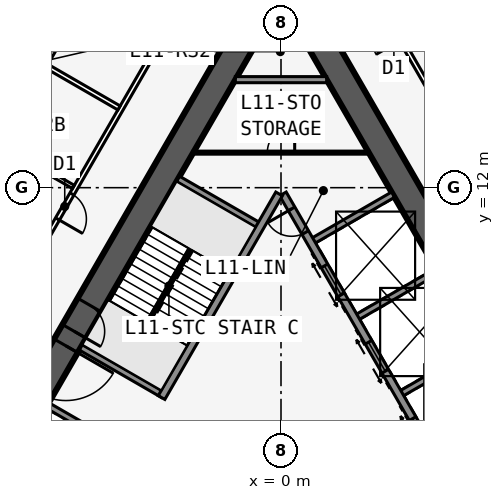
"""IFC4 building model, lengths in metres.
Left out: names, types, materials, properties, quantities, classifications, styles, units other than length and angle.
Written with IfcOpenShell. Run it as: python <this file> out.ifc"""

import sys

from ifc_helpers import new_model, si_unit, direction, frame, frame_2d, origin, place, context, subcontext, project, spatial, rectangle, extrude, element, fill, save


model = new_model("IFC4")
c1 = context("Model", 3, precision=1e-05, world=origin(), true_north=direction((0.0, 1.0)))
c2 = subcontext(c1, "Body", "Model", "MODEL_VIEW")
j1 = project(units=[si_unit("LENGTHUNIT", "METRE"), si_unit("PLANEANGLEUNIT", "RADIAN")], contexts=[c1])
p1 = place(None, origin())
s1 = spatial("IfcSite", under=j1, at=p1, CompositionType="ELEMENT")
p2 = place(p1, origin())
s2 = spatial("IfcBuilding", under=s1, at=p2, CompositionType="ELEMENT")
p3 = place(p2, frame((0.0, 0.0, 48.9)))
s3 = spatial("IfcBuildingStorey", under=s2, at=p3, CompositionType="ELEMENT", Elevation=48.9)
p4 = place(p3, frame((16.5, -9.526, 0.0), z_axis=(0.0, 0.0, 1.0), x_axis=(-0.499999749417, 0.866025548458, 0.0)))
e1 = element("IfcWall", 1, at=p4, inside=s3, PredefinedType="SHEAR", context=c2, shape_type="SweptSolid", body=[
    extrude(rectangle(XDim=33.0, YDim=0.9, at=frame_2d((16.5, 0.0))), origin(), (0.0, 0.0, 1.0), 3.4),
])
p5 = place(p4, frame((14.15, 0.0, 0.0)))
e2 = element("IfcOpeningElement", 2, at=p5, cuts=e1, PredefinedType="OPENING", context=c2, shape_type="SweptSolid", body=[
    extrude(rectangle(XDim=1.8, YDim=2.13, at=frame_2d((0.9, 1.065))), frame((0.0, 0.46, 0.0), z_axis=(0.0, -1.0, 0.0), x_axis=(1.0, 0.0, 0.0)), (0.0, 0.0, 1.0), 0.92),
])
p6 = place(p4, frame((12.6, 0.0, 0.0)))
e3 = element("IfcOpeningElement", 3, at=p6, cuts=e1, PredefinedType="OPENING", context=c2, shape_type="SweptSolid", body=[
    extrude(rectangle(XDim=1.0, YDim=2.13, at=frame_2d((0.5, 1.065))), frame((0.0, 0.46, 0.0), z_axis=(0.0, -1.0, 0.0), x_axis=(1.0, 0.0, 0.0)), (0.0, 0.0, 1.0), 0.92),
])
p7 = place(p3, frame((5.379, 2.586, 0.0), z_axis=(0.0, 0.0, 1.0), x_axis=(-0.500001375892, 0.866024609411, 0.0)))
e4 = element("IfcWall", 4, at=p7, inside=s3, PredefinedType="SOLIDWALL", context=c2, shape_type="SweptSolid", body=[
    extrude(rectangle(XDim=10.633, YDim=0.25, at=frame_2d((5.316, 0.0))), origin(), (0.0, 0.0, 1.0), 3.235),
])
p8 = place(p7, frame((9.164, 0.0, 0.0)))
e5 = element("IfcOpeningElement", 5, at=p8, cuts=e4, PredefinedType="OPENING", context=c2, shape_type="SweptSolid", body=[
    extrude(rectangle(XDim=0.9, YDim=2.13, at=frame_2d((0.45, 1.065))), frame((0.0, 0.135, 0.0), z_axis=(0.0, -1.0, 0.0), x_axis=(1.0, 0.0, 0.0)), (0.0, 0.0, 1.0), 0.27),
])
p9 = place(p7, frame((1.0, 0.0, 0.0)))
e6 = element("IfcOpeningElement", 6, at=p9, cuts=e4, PredefinedType="OPENING", context=c2, shape_type="SweptSolid", body=[
    extrude(rectangle(XDim=1.1, YDim=2.13, at=frame_2d((0.55, 1.065))), frame((0.0, 0.135, 0.0), z_axis=(0.0, -1.0, 0.0), x_axis=(1.0, 0.0, 0.0)), (0.0, 0.0, 1.0), 0.27),
])
p10 = place(p7, frame((3.9, 0.0, 0.0)))
e7 = element("IfcOpeningElement", 7, at=p10, cuts=e4, PredefinedType="OPENING", context=c2, shape_type="SweptSolid", body=[
    extrude(rectangle(XDim=1.1, YDim=2.13, at=frame_2d((0.55, 1.065))), frame((0.0, 0.135, 0.0), z_axis=(0.0, -1.0, 0.0), x_axis=(1.0, 0.0, 0.0)), (0.0, 0.0, 1.0), 0.27),
])
p11 = place(p7, frame((6.8, 0.0, 0.0)))
e8 = element("IfcOpeningElement", 8, at=p11, cuts=e4, PredefinedType="OPENING", context=c2, shape_type="SweptSolid", body=[
    extrude(rectangle(XDim=1.1, YDim=2.13, at=frame_2d((0.55, 1.065))), frame((0.0, 0.135, 0.0), z_axis=(0.0, -1.0, 0.0), x_axis=(1.0, 0.0, 0.0)), (0.0, 0.0, 1.0), 0.27),
])
for number, where, z_axis, x_axis in (
    (9, (3.879, 5.184, 0.0), (0.0, 0.0, 1.0), (0.866, 0.5, 0.0)),
    (10, (2.429, 7.696, 0.0), (0.0, 0.0, 1.0), (0.866, 0.5, 0.0)),
    (11, (0.979, 10.207, 0.0), (0.0, 0.0, 1.0), (0.866, 0.5, 0.0)),
):
    element("IfcWall", number, at=place(p3, frame(where, z_axis=z_axis, x_axis=x_axis)), inside=s3, PredefinedType="SOLIDWALL", context=c2, shape_type="SweptSolid", body=[
        extrude(rectangle(XDim=3.125, YDim=0.2, at=frame_2d((1.562, 0.0))), origin(), (0.0, 0.0, 1.0), 3.235),
    ])
p12 = place(p3, frame((0.0, 19.052, 0.0), z_axis=(0.0, 0.0, 1.0), x_axis=(-0.499999749417, -0.866025548458, 0.0)))
e12 = element("IfcWall", 12, at=p12, inside=s3, PredefinedType="SHEAR", context=c2, shape_type="SweptSolid", body=[
    extrude(rectangle(XDim=33.0, YDim=0.9, at=frame_2d((16.5, 0.0))), origin(), (0.0, 0.0, 1.0), 3.4),
])
p13 = place(p12, frame((14.15, 0.0, 0.0)))
e13 = element("IfcOpeningElement", 13, at=p13, cuts=e12, PredefinedType="OPENING", context=c2, shape_type="SweptSolid", body=[
    extrude(rectangle(XDim=1.8, YDim=2.13, at=frame_2d((0.9, 1.065))), frame((0.0, 0.46, 0.0), z_axis=(0.0, -1.0, 0.0), x_axis=(1.0, 0.0, 0.0)), (0.0, 0.0, 1.0), 0.92),
])
p14 = place(p12, frame((12.6, 0.0, 0.0)))
e14 = element("IfcOpeningElement", 14, at=p14, cuts=e12, PredefinedType="OPENING", context=c2, shape_type="SweptSolid", body=[
    extrude(rectangle(XDim=1.0, YDim=2.13, at=frame_2d((0.5, 1.065))), frame((0.0, 0.46, 0.0), z_axis=(0.0, -1.0, 0.0), x_axis=(1.0, 0.0, 0.0)), (0.0, 0.0, 1.0), 0.92),
])
p15 = place(p3, frame((-0.062, 11.794, 0.0), z_axis=(0.0, 0.0, 1.0), x_axis=(-0.500006680225, -0.86602154692, 0.0)))
e15 = element("IfcWall", 15, at=p15, inside=s3, PredefinedType="SOLIDWALL", context=c2, shape_type="SweptSolid", body=[
    extrude(rectangle(XDim=7.733, YDim=0.25, at=frame_2d((3.866, 0.0))), origin(), (0.0, 0.0, 1.0), 3.235),
])
for number, where, z_axis, x_axis in (
    (16, (-0.679, 10.727, 0.0), (0.0, 0.0, 1.0), (-0.866, 0.5, 0.0)),
    (17, (-3.879, 5.184, 0.0), (0.0, 0.0, 1.0), (-0.866, 0.5, 0.0)),
    (18, (-4.979, 3.279, 0.0), (0.0, 0.0, 1.0), (-0.866, 0.5, 0.0)),
):
    element("IfcWall", number, at=place(p3, frame(where, z_axis=z_axis, x_axis=x_axis)), inside=s3, PredefinedType="SOLIDWALL", context=c2, shape_type="SweptSolid", body=[
        extrude(rectangle(XDim=3.125, YDim=0.2, at=frame_2d((1.562, 0.0))), origin(), (0.0, 0.0, 1.0), 3.235),
    ])
p16 = place(p3, frame((20.027, -10.985, 0.0), z_axis=(0.0, 0.0, 1.0), x_axis=(-0.500001677587, 0.866024435227, 0.0)))
e19 = element("IfcWall", 19, at=p16, inside=s3, PredefinedType="PARTITIONING", context=c2, shape_type="SweptSolid", body=[
    extrude(rectangle(XDim=39.054, YDim=0.15, at=frame_2d((19.527, 0.0))), origin(), (0.0, 0.0, 1.0), 3.235),
])
p17 = place(p16, frame((1.558, 0.0, 0.0)))
e20 = element("IfcOpeningElement", 20, at=p17, cuts=e19, PredefinedType="OPENING", context=c2, shape_type="SweptSolid", body=[
    extrude(rectangle(XDim=0.95, YDim=2.13, at=frame_2d((0.475, 1.065))), frame((0.0, 0.085, 0.0), z_axis=(0.0, -1.0, 0.0), x_axis=(1.0, 0.0, 0.0)), (0.0, 0.0, 1.0), 0.17),
])
p18 = place(p16, frame((12.152, 0.0, 0.0)))
e21 = element("IfcOpeningElement", 21, at=p18, cuts=e19, PredefinedType="OPENING", context=c2, shape_type="SweptSolid", body=[
    extrude(rectangle(XDim=0.95, YDim=2.13, at=frame_2d((0.475, 1.065))), frame((0.0, 0.085, 0.0), z_axis=(0.0, -1.0, 0.0), x_axis=(1.0, 0.0, 0.0)), (0.0, 0.0, 1.0), 0.17),
])
p19 = place(p16, frame((17.152, 0.0, 0.0)))
e22 = element("IfcOpeningElement", 22, at=p19, cuts=e19, PredefinedType="OPENING", context=c2, shape_type="SweptSolid", body=[
    extrude(rectangle(XDim=0.95, YDim=2.13, at=frame_2d((0.475, 1.065))), frame((0.0, 0.085, 0.0), z_axis=(0.0, -1.0, 0.0), x_axis=(1.0, 0.0, 0.0)), (0.0, 0.0, 1.0), 0.17),
])
p20 = place(p16, frame((21.552, 0.0, 0.0)))
e23 = element("IfcOpeningElement", 23, at=p20, cuts=e19, PredefinedType="OPENING", context=c2, shape_type="SweptSolid", body=[
    extrude(rectangle(XDim=0.95, YDim=2.13, at=frame_2d((0.475, 1.065))), frame((0.0, 0.085, 0.0), z_axis=(0.0, -1.0, 0.0), x_axis=(1.0, 0.0, 0.0)), (0.0, 0.0, 1.0), 0.17),
])
p21 = place(p16, frame((32.152, 0.0, 0.0)))
e24 = element("IfcOpeningElement", 24, at=p21, cuts=e19, PredefinedType="OPENING", context=c2, shape_type="SweptSolid", body=[
    extrude(rectangle(XDim=0.95, YDim=2.13, at=frame_2d((0.475, 1.065))), frame((0.0, 0.085, 0.0), z_axis=(0.0, -1.0, 0.0), x_axis=(1.0, 0.0, 0.0)), (0.0, 0.0, 1.0), 0.17),
])
p22 = place(p16, frame((37.752, 0.0, 0.0)))
e25 = element("IfcOpeningElement", 25, at=p22, cuts=e19, PredefinedType="OPENING", context=c2, shape_type="SweptSolid", body=[
    extrude(rectangle(XDim=0.95, YDim=2.13, at=frame_2d((0.475, 1.065))), frame((0.0, 0.085, 0.0), z_axis=(0.0, -1.0, 0.0), x_axis=(1.0, 0.0, 0.0)), (0.0, 0.0, 1.0), 0.17),
])
p23 = place(p3, frame((-0.5, 22.836, 0.0), z_axis=(0.0, 0.0, 1.0), x_axis=(-0.500001677587, -0.866024435227, 0.0)))
e26 = element("IfcWall", 26, at=p23, inside=s3, PredefinedType="PARTITIONING", context=c2, shape_type="SweptSolid", body=[
    extrude(rectangle(XDim=39.054, YDim=0.15, at=frame_2d((19.527, 0.0))), origin(), (0.0, 0.0, 1.0), 3.235),
])
p24 = place(p23, frame((1.558, 0.0, 0.0)))
e27 = element("IfcOpeningElement", 27, at=p24, cuts=e26, PredefinedType="OPENING", context=c2, shape_type="SweptSolid", body=[
    extrude(rectangle(XDim=0.95, YDim=2.13, at=frame_2d((0.475, 1.065))), frame((0.0, 0.085, 0.0), z_axis=(0.0, -1.0, 0.0), x_axis=(1.0, 0.0, 0.0)), (0.0, 0.0, 1.0), 0.17),
])
p25 = place(p23, frame((12.752, 0.0, 0.0)))
e28 = element("IfcOpeningElement", 28, at=p25, cuts=e26, PredefinedType="OPENING", context=c2, shape_type="SweptSolid", body=[
    extrude(rectangle(XDim=0.95, YDim=2.13, at=frame_2d((0.475, 1.065))), frame((0.0, 0.085, 0.0), z_axis=(0.0, -1.0, 0.0), x_axis=(1.0, 0.0, 0.0)), (0.0, 0.0, 1.0), 0.17),
])
p26 = place(p23, frame((17.152, 0.0, 0.0)))
e29 = element("IfcOpeningElement", 29, at=p26, cuts=e26, PredefinedType="OPENING", context=c2, shape_type="SweptSolid", body=[
    extrude(rectangle(XDim=0.95, YDim=2.13, at=frame_2d((0.475, 1.065))), frame((0.0, 0.085, 0.0), z_axis=(0.0, -1.0, 0.0), x_axis=(1.0, 0.0, 0.0)), (0.0, 0.0, 1.0), 0.17),
])
p27 = place(p23, frame((22.152, 0.0, 0.0)))
e30 = element("IfcOpeningElement", 30, at=p27, cuts=e26, PredefinedType="OPENING", context=c2, shape_type="SweptSolid", body=[
    extrude(rectangle(XDim=0.95, YDim=2.13, at=frame_2d((0.475, 1.065))), frame((0.0, 0.085, 0.0), z_axis=(0.0, -1.0, 0.0), x_axis=(1.0, 0.0, 0.0)), (0.0, 0.0, 1.0), 0.17),
])
p28 = place(p23, frame((27.152, 0.0, 0.0)))
e31 = element("IfcOpeningElement", 31, at=p28, cuts=e26, PredefinedType="OPENING", context=c2, shape_type="SweptSolid", body=[
    extrude(rectangle(XDim=0.95, YDim=2.13, at=frame_2d((0.475, 1.065))), frame((0.0, 0.085, 0.0), z_axis=(0.0, -1.0, 0.0), x_axis=(1.0, 0.0, 0.0)), (0.0, 0.0, 1.0), 0.17),
])
p29 = place(p23, frame((36.546, 0.0, 0.0)))
e32 = element("IfcOpeningElement", 32, at=p29, cuts=e26, PredefinedType="OPENING", context=c2, shape_type="SweptSolid", body=[
    extrude(rectangle(XDim=0.95, YDim=2.13, at=frame_2d((0.475, 1.065))), frame((0.0, 0.085, 0.0), z_axis=(0.0, -1.0, 0.0), x_axis=(1.0, 0.0, 0.0)), (0.0, 0.0, 1.0), 0.17),
])
p30 = place(p3, frame((-5.329, 14.623, 0.0), z_axis=(0.0, 0.0, 1.0), x_axis=(-0.866018409083, 0.500012114982, 0.0)))
e33 = element("IfcWall", 33, at=p30, inside=s3, PredefinedType="PARTITIONING", context=c2, shape_type="SweptSolid", body=[
    extrude(rectangle(XDim=9.485, YDim=0.15, at=frame_2d((4.742, 0.0))), origin(), (0.0, 0.0, 1.0), 2.389),
])
p31 = place(p3, frame((-6.253, 18.622, 0.0), z_axis=(0.0, 0.0, 1.0), x_axis=(-0.499990139034, -0.866031096941, 0.0)))
e34 = element("IfcWall", 34, at=p31, inside=s3, PredefinedType="PLUMBINGWALL", context=c2, shape_type="SweptSolid", body=[
    extrude(rectangle(XDim=3.0, YDim=0.12, at=frame_2d((1.5, 0.0))), origin(), (0.0, 0.0, 1.0), 3.235),
])
p32 = place(p3, frame((-6.829, 12.025, 0.0), z_axis=(0.0, 0.0, 1.0), x_axis=(-0.866035715982, 0.499982138324, 0.0)))
e35 = element("IfcWall", 35, at=p32, inside=s3, PredefinedType="PLUMBINGWALL", context=c2, shape_type="SweptSolid", body=[
    extrude(rectangle(XDim=2.74, YDim=0.12, at=frame_2d((1.37, 0.0))), origin(), (0.0, 0.0, 1.0), 3.235),
])
p33 = place(p32, frame((1.55, 0.0, 0.0)))
e36 = element("IfcOpeningElement", 36, at=p33, cuts=e35, PredefinedType="OPENING", context=c2, shape_type="SweptSolid", body=[
    extrude(rectangle(XDim=0.9, YDim=2.13, at=frame_2d((0.45, 1.065))), frame((0.0, 0.07, 0.0), z_axis=(0.0, -1.0, 0.0), x_axis=(1.0, 0.0, 0.0)), (0.0, 0.0, 1.0), 0.14),
])
p34 = place(p3, frame((-1.501, 15.552, 0.0), z_axis=(0.0, 0.0, 1.0), x_axis=(1.0, 0.0, 0.0)))
e37 = element("IfcWall", 37, at=p34, inside=s3, PredefinedType="SOLIDWALL", context=c2, shape_type="SweptSolid", body=[
    extrude(rectangle(XDim=3.002, YDim=0.2, at=frame_2d((1.501, 0.0))), origin(), (0.0, 0.0, 1.0), 3.235),
])
p35 = place(p3, frame((-2.887, 13.153, 0.0), z_axis=(0.0, 0.0, 1.0), x_axis=(1.0, 0.0, 0.0)))
e38 = element("IfcWall", 38, at=p35, inside=s3, PredefinedType="PARTITIONING", context=c2, shape_type="SweptSolid", body=[
    extrude(rectangle(XDim=5.773, YDim=0.1, at=frame_2d((2.887, 0.0))), origin(), (0.0, 0.0, 1.0), 3.235),
])
p36 = place(p35, frame((2.437, 0.0, 0.0)))
e39 = element("IfcOpeningElement", 39, at=p36, cuts=e38, PredefinedType="OPENING", context=c2, shape_type="SweptSolid", body=[
    extrude(rectangle(XDim=0.9, YDim=2.13, at=frame_2d((0.45, 1.065))), frame((0.0, 0.06, 0.0), z_axis=(0.0, -1.0, 0.0), x_axis=(1.0, 0.0, 0.0)), (0.0, 0.0, 1.0), 0.12),
])
p37 = place(p3, frame((-2.988, 9.978, 0.0), z_axis=(0.0, 0.0, 1.0), x_axis=(-0.499992232847, -0.866029888106, 0.0)))
e40 = element("IfcWall", 40, at=p37, inside=s3, PredefinedType="SOLIDWALL", context=c2, shape_type="SweptSolid", body=[
    extrude(rectangle(XDim=2.794, YDim=0.1, at=frame_2d((1.397, 0.0))), origin(), (0.0, 0.0, 1.0), 3.4),
])
p38 = place(p25, origin())
e41 = element("IfcDoor", 41, at=p38, inside=s3, OperationType="SINGLE_SWING_RIGHT", PredefinedType="DOOR", context=c2, shape_type="SweptSolid", body=[
    extrude(rectangle(XDim=0.95, YDim=2.13, at=frame_2d((0.475, 1.065))), frame((0.0, 0.025, 0.0), z_axis=(0.0, -1.0, 0.0), x_axis=(1.0, 0.0, 0.0)), (0.0, 0.0, 1.0), 0.05),
])
fill(e28, e41)
p39 = place(p13, origin())
e42 = element("IfcDoor", 42, at=p39, inside=s3, OperationType="DOUBLE_DOOR_SINGLE_SWING", PredefinedType="DOOR", context=c2, shape_type="SweptSolid", body=[
    extrude(rectangle(XDim=1.8, YDim=2.13, at=frame_2d((0.9, 1.065))), frame((0.0, 0.025, 0.0), z_axis=(0.0, -1.0, 0.0), x_axis=(1.0, 0.0, 0.0)), (0.0, 0.0, 1.0), 0.05),
])
fill(e13, e42)
p40 = place(p14, origin())
e43 = element("IfcDoor", 43, at=p40, inside=s3, OperationType="SINGLE_SWING_RIGHT", PredefinedType="DOOR", context=c2, shape_type="SweptSolid", body=[
    extrude(rectangle(XDim=1.0, YDim=2.13, at=frame_2d((0.5, 1.065))), frame((0.0, 0.025, 0.0), z_axis=(0.0, -1.0, 0.0), x_axis=(1.0, 0.0, 0.0)), (0.0, 0.0, 1.0), 0.05),
])
fill(e14, e43)
p41 = place(p36, origin())
e44 = element("IfcDoor", 44, at=p41, inside=s3, OperationType="SINGLE_SWING_RIGHT", PredefinedType="DOOR", context=c2, shape_type="SweptSolid", body=[
    extrude(rectangle(XDim=0.9, YDim=2.13, at=frame_2d((0.45, 1.065))), frame((0.0, 0.025, 0.0), z_axis=(0.0, -1.0, 0.0), x_axis=(1.0, 0.0, 0.0)), (0.0, 0.0, 1.0), 0.05),
])
fill(e39, e44)
p42 = place(p8, origin())
e45 = element("IfcDoor", 45, at=p42, inside=s3, OperationType="SINGLE_SWING_RIGHT", PredefinedType="DOOR", context=c2, shape_type="SweptSolid", body=[
    extrude(rectangle(XDim=0.9, YDim=2.13, at=frame_2d((0.45, 1.065))), frame((0.0, 0.025, 0.0), z_axis=(0.0, -1.0, 0.0), x_axis=(1.0, 0.0, 0.0)), (0.0, 0.0, 1.0), 0.05),
])
fill(e5, e45)
p43 = place(p9, origin())
e46 = element("IfcDoor", 46, at=p43, inside=s3, OperationType="DOUBLE_DOOR_SLIDING", PredefinedType="USERDEFINED", context=c2, shape_type="SweptSolid", body=[
    extrude(rectangle(XDim=1.1, YDim=2.13, at=frame_2d((0.55, 1.065))), frame((0.0, 0.025, 0.0), z_axis=(0.0, -1.0, 0.0), x_axis=(1.0, 0.0, 0.0)), (0.0, 0.0, 1.0), 0.05),
])
fill(e6, e46)
p44 = place(p10, origin())
e47 = element("IfcDoor", 47, at=p44, inside=s3, OperationType="DOUBLE_DOOR_SLIDING", PredefinedType="USERDEFINED", context=c2, shape_type="SweptSolid", body=[
    extrude(rectangle(XDim=1.1, YDim=2.13, at=frame_2d((0.55, 1.065))), frame((0.0, 0.025, 0.0), z_axis=(0.0, -1.0, 0.0), x_axis=(1.0, 0.0, 0.0)), (0.0, 0.0, 1.0), 0.05),
])
fill(e7, e47)
p45 = place(p11, origin())
e48 = element("IfcDoor", 48, at=p45, inside=s3, OperationType="DOUBLE_DOOR_SLIDING", PredefinedType="USERDEFINED", context=c2, shape_type="SweptSolid", body=[
    extrude(rectangle(XDim=1.1, YDim=2.13, at=frame_2d((0.55, 1.065))), frame((0.0, 0.025, 0.0), z_axis=(0.0, -1.0, 0.0), x_axis=(1.0, 0.0, 0.0)), (0.0, 0.0, 1.0), 0.05),
])
fill(e8, e48)
save(model, sys.argv[1])
